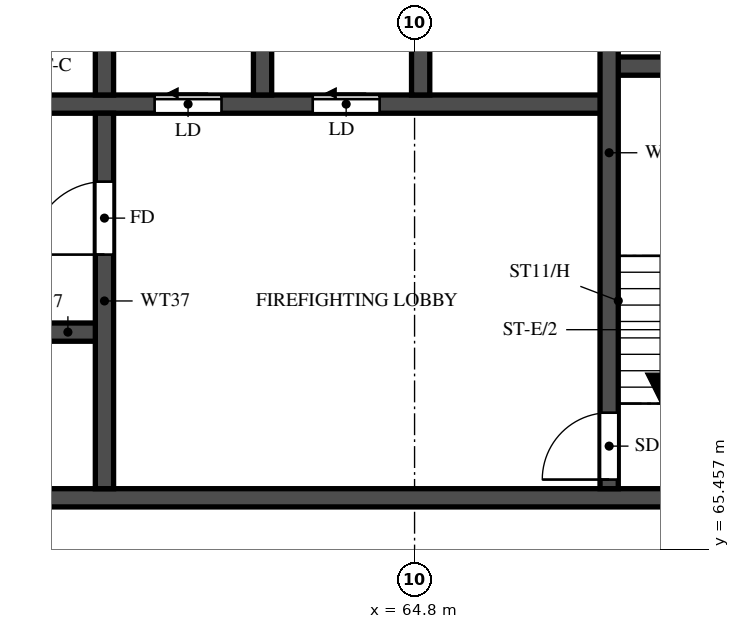
"""IFC4 building model, lengths in metres.
Left out: names, types, materials, properties, quantities, classifications, styles, units other than length and angle.
Written with IfcOpenShell. Run it as: python <this file> out.ifc"""

import sys

from ifc_helpers import new_model, si_unit, direction, frame, frame_2d, origin, place, context, subcontext, project, spatial, rectangle, extrude, element, fill, save


model = new_model("IFC4")
c1 = context("Model", 3, precision=1e-05, world=origin(), true_north=direction((0.0, 1.0)))
c2 = subcontext(c1, "Body", "Model", "MODEL_VIEW")
j1 = project(units=[si_unit("LENGTHUNIT", "METRE"), si_unit("PLANEANGLEUNIT", "RADIAN")], contexts=[c1])
p1 = place(None, origin())
s1 = spatial("IfcSite", under=j1, at=p1, CompositionType="ELEMENT")
p2 = place(p1, origin())
s2 = spatial("IfcBuilding", under=s1, at=p2, CompositionType="ELEMENT")
p3 = place(p2, frame((0.0, 0.0, 232.5)))
s3 = spatial("IfcBuildingStorey", under=s2, at=p3, CompositionType="ELEMENT", Elevation=232.5)
p4 = place(p3, frame((29.2, 66.3, 0.0), z_axis=(0.0, 0.0, 1.0), x_axis=(1.0, 0.0, 0.0)))
e1 = element("IfcWall", 1, at=p4, inside=s3, PredefinedType="SHEAR", context=c2, shape_type="SweptSolid", body=[
    extrude(rectangle(XDim=42.4, YDim=0.3, at=frame_2d((21.2, 0.0))), origin(), (0.0, 0.0, 1.0), 3.22),
])
p5 = place(p4, frame((1.425, 0.0, 0.0)))
e2 = element("IfcOpeningElement", 2, at=p5, cuts=e1, PredefinedType="OPENING", context=c2, shape_type="SweptSolid", body=[
    extrude(rectangle(XDim=1.1, YDim=2.1, at=frame_2d((0.55, 1.05))), frame((0.0, 0.16, 0.0), z_axis=(0.0, -1.0, 0.0), x_axis=(1.0, 0.0, 0.0)), (0.0, 0.0, 1.0), 0.32),
])
p6 = place(p4, frame((4.2, 0.0, 0.0)))
e3 = element("IfcOpeningElement", 3, at=p6, cuts=e1, PredefinedType="OPENING", context=c2, shape_type="SweptSolid", body=[
    extrude(rectangle(XDim=1.8, YDim=2.1, at=frame_2d((0.9, 1.05))), frame((0.0, 0.16, 0.0), z_axis=(0.0, -1.0, 0.0), x_axis=(1.0, 0.0, 0.0)), (0.0, 0.0, 1.0), 0.32),
])
p7 = place(p3, frame((35.65, 69.025, 0.0), z_axis=(0.0, 0.0, 1.0), x_axis=(1.0, 0.0, 0.0)))
e4 = element("IfcWall", 4, at=p7, inside=s3, PredefinedType="SHEAR", context=c2, shape_type="SweptSolid", body=[
    extrude(rectangle(XDim=24.05, YDim=0.3, at=frame_2d((12.025, 0.0))), origin(), (0.0, 0.0, 1.0), 3.22),
])
p8 = place(p7, frame((0.975, 0.0, 0.0)))
e5 = element("IfcOpeningElement", 5, at=p8, cuts=e4, PredefinedType="OPENING", context=c2, shape_type="SweptSolid", body=[
    extrude(rectangle(XDim=1.1, YDim=2.1, at=frame_2d((0.55, 1.05))), frame((0.0, 0.16, 0.0), z_axis=(0.0, -1.0, 0.0), x_axis=(1.0, 0.0, 0.0)), (0.0, 0.0, 1.0), 0.32),
])
p9 = place(p7, frame((3.725, 0.0, 0.0)))
e6 = element("IfcOpeningElement", 6, at=p9, cuts=e4, PredefinedType="OPENING", context=c2, shape_type="SweptSolid", body=[
    extrude(rectangle(XDim=1.1, YDim=2.1, at=frame_2d((0.55, 1.05))), frame((0.0, 0.16, 0.0), z_axis=(0.0, -1.0, 0.0), x_axis=(1.0, 0.0, 0.0)), (0.0, 0.0, 1.0), 0.32),
])
p10 = place(p7, frame((6.475, 0.0, 0.0)))
e7 = element("IfcOpeningElement", 7, at=p10, cuts=e4, PredefinedType="OPENING", context=c2, shape_type="SweptSolid", body=[
    extrude(rectangle(XDim=1.1, YDim=2.1, at=frame_2d((0.55, 1.05))), frame((0.0, 0.16, 0.0), z_axis=(0.0, -1.0, 0.0), x_axis=(1.0, 0.0, 0.0)), (0.0, 0.0, 1.0), 0.32),
])
p11 = place(p7, frame((9.225, 0.0, 0.0)))
e8 = element("IfcOpeningElement", 8, at=p11, cuts=e4, PredefinedType="OPENING", context=c2, shape_type="SweptSolid", body=[
    extrude(rectangle(XDim=1.1, YDim=2.1, at=frame_2d((0.55, 1.05))), frame((0.0, 0.16, 0.0), z_axis=(0.0, -1.0, 0.0), x_axis=(1.0, 0.0, 0.0)), (0.0, 0.0, 1.0), 0.32),
])
p12 = place(p7, frame((11.975, 0.0, 0.0)))
e9 = element("IfcOpeningElement", 9, at=p12, cuts=e4, PredefinedType="OPENING", context=c2, shape_type="SweptSolid", body=[
    extrude(rectangle(XDim=1.1, YDim=2.1, at=frame_2d((0.55, 1.05))), frame((0.0, 0.16, 0.0), z_axis=(0.0, -1.0, 0.0), x_axis=(1.0, 0.0, 0.0)), (0.0, 0.0, 1.0), 0.32),
])
p13 = place(p7, frame((14.725, 0.0, 0.0)))
e10 = element("IfcOpeningElement", 10, at=p13, cuts=e4, PredefinedType="OPENING", context=c2, shape_type="SweptSolid", body=[
    extrude(rectangle(XDim=1.1, YDim=2.1, at=frame_2d((0.55, 1.05))), frame((0.0, 0.16, 0.0), z_axis=(0.0, -1.0, 0.0), x_axis=(1.0, 0.0, 0.0)), (0.0, 0.0, 1.0), 0.32),
])
p14 = place(p7, frame((17.6, 0.0, 0.0)))
e11 = element("IfcOpeningElement", 11, at=p14, cuts=e4, PredefinedType="OPENING", context=c2, shape_type="SweptSolid", body=[
    extrude(rectangle(XDim=1.1, YDim=2.1, at=frame_2d((0.55, 1.05))), frame((0.0, 0.16, 0.0), z_axis=(0.0, -1.0, 0.0), x_axis=(1.0, 0.0, 0.0)), (0.0, 0.0, 1.0), 0.32),
])
p15 = place(p7, frame((20.6, 0.0, 0.0)))
e12 = element("IfcOpeningElement", 12, at=p15, cuts=e4, PredefinedType="OPENING", context=c2, shape_type="SweptSolid", body=[
    extrude(rectangle(XDim=1.1, YDim=2.1, at=frame_2d((0.55, 1.05))), frame((0.0, 0.16, 0.0), z_axis=(0.0, -1.0, 0.0), x_axis=(1.0, 0.0, 0.0)), (0.0, 0.0, 1.0), 0.32),
])
p16 = place(p3, frame((32.8, 72.775, 0.0), z_axis=(0.0, 0.0, 1.0), x_axis=(1.0, 0.0, 0.0)))
e13 = element("IfcWall", 13, at=p16, inside=s3, PredefinedType="SHEAR", context=c2, shape_type="SweptSolid", body=[
    extrude(rectangle(XDim=35.2, YDim=0.3, at=frame_2d((17.6, 0.0))), origin(), (0.0, 0.0, 1.0), 3.22),
])
p17 = place(p16, frame((19.8, 0.0, 0.0)))
e14 = element("IfcOpeningElement", 14, at=p17, cuts=e13, PredefinedType="OPENING", context=c2, shape_type="SweptSolid", body=[
    extrude(rectangle(XDim=1.1, YDim=2.1, at=frame_2d((0.55, 1.05))), frame((0.0, 0.16, 0.0), z_axis=(0.0, -1.0, 0.0), x_axis=(1.0, 0.0, 0.0)), (0.0, 0.0, 1.0), 0.32),
])
p18 = place(p16, frame((27.725, 0.0, 0.0)))
e15 = element("IfcOpeningElement", 15, at=p18, cuts=e13, PredefinedType="OPENING", context=c2, shape_type="SweptSolid", body=[
    extrude(rectangle(XDim=1.1, YDim=2.1, at=frame_2d((0.55, 1.05))), frame((0.0, 0.16, 0.0), z_axis=(0.0, -1.0, 0.0), x_axis=(1.0, 0.0, 0.0)), (0.0, 0.0, 1.0), 0.32),
])
p19 = place(p16, frame((30.325, 0.0, 0.0)))
e16 = element("IfcOpeningElement", 16, at=p19, cuts=e13, PredefinedType="OPENING", context=c2, shape_type="SweptSolid", body=[
    extrude(rectangle(XDim=1.1, YDim=2.1, at=frame_2d((0.55, 1.05))), frame((0.0, 0.16, 0.0), z_axis=(0.0, -1.0, 0.0), x_axis=(1.0, 0.0, 0.0)), (0.0, 0.0, 1.0), 0.32),
])
p20 = place(p16, frame((3.825, 0.0, 0.0)))
e17 = element("IfcOpeningElement", 17, at=p20, cuts=e13, PredefinedType="OPENING", context=c2, shape_type="SweptSolid", body=[
    extrude(rectangle(XDim=1.1, YDim=2.1, at=frame_2d((0.55, 1.05))), frame((0.0, 0.16, 0.0), z_axis=(0.0, -1.0, 0.0), x_axis=(1.0, 0.0, 0.0)), (0.0, 0.0, 1.0), 0.32),
])
p21 = place(p16, frame((6.575, 0.0, 0.0)))
e18 = element("IfcOpeningElement", 18, at=p21, cuts=e13, PredefinedType="OPENING", context=c2, shape_type="SweptSolid", body=[
    extrude(rectangle(XDim=1.1, YDim=2.1, at=frame_2d((0.55, 1.05))), frame((0.0, 0.16, 0.0), z_axis=(0.0, -1.0, 0.0), x_axis=(1.0, 0.0, 0.0)), (0.0, 0.0, 1.0), 0.32),
])
p22 = place(p16, frame((9.325, 0.0, 0.0)))
e19 = element("IfcOpeningElement", 19, at=p22, cuts=e13, PredefinedType="OPENING", context=c2, shape_type="SweptSolid", body=[
    extrude(rectangle(XDim=1.1, YDim=2.1, at=frame_2d((0.55, 1.05))), frame((0.0, 0.16, 0.0), z_axis=(0.0, -1.0, 0.0), x_axis=(1.0, 0.0, 0.0)), (0.0, 0.0, 1.0), 0.32),
])
p23 = place(p16, frame((12.075, 0.0, 0.0)))
e20 = element("IfcOpeningElement", 20, at=p23, cuts=e13, PredefinedType="OPENING", context=c2, shape_type="SweptSolid", body=[
    extrude(rectangle(XDim=1.1, YDim=2.1, at=frame_2d((0.55, 1.05))), frame((0.0, 0.16, 0.0), z_axis=(0.0, -1.0, 0.0), x_axis=(1.0, 0.0, 0.0)), (0.0, 0.0, 1.0), 0.32),
])
p24 = place(p16, frame((14.825, 0.0, 0.0)))
e21 = element("IfcOpeningElement", 21, at=p24, cuts=e13, PredefinedType="OPENING", context=c2, shape_type="SweptSolid", body=[
    extrude(rectangle(XDim=1.1, YDim=2.1, at=frame_2d((0.55, 1.05))), frame((0.0, 0.16, 0.0), z_axis=(0.0, -1.0, 0.0), x_axis=(1.0, 0.0, 0.0)), (0.0, 0.0, 1.0), 0.32),
])
p25 = place(p16, frame((17.575, 0.0, 0.0)))
e22 = element("IfcOpeningElement", 22, at=p25, cuts=e13, PredefinedType="OPENING", context=c2, shape_type="SweptSolid", body=[
    extrude(rectangle(XDim=1.1, YDim=2.1, at=frame_2d((0.55, 1.05))), frame((0.0, 0.16, 0.0), z_axis=(0.0, -1.0, 0.0), x_axis=(1.0, 0.0, 0.0)), (0.0, 0.0, 1.0), 0.32),
])
p26 = place(p16, frame((0.95, 0.0, 0.0)))
e23 = element("IfcOpeningElement", 23, at=p26, cuts=e13, PredefinedType="OPENING", context=c2, shape_type="SweptSolid", body=[
    extrude(rectangle(XDim=1.1, YDim=2.1, at=frame_2d((0.55, 1.05))), frame((0.0, 0.16, 0.0), z_axis=(0.0, -1.0, 0.0), x_axis=(1.0, 0.0, 0.0)), (0.0, 0.0, 1.0), 0.32),
])
p27 = place(p3, frame((68.0, 73.4, 0.0), z_axis=(0.0, 0.0, 1.0), x_axis=(1.0, 0.0, 0.0)))
e24 = element("IfcWall", 24, at=p27, inside=s3, PredefinedType="SHEAR", context=c2, shape_type="SweptSolid", body=[
    extrude(rectangle(XDim=3.1, YDim=0.3, at=frame_2d((1.55, 0.0))), origin(), (0.0, 0.0, 1.0), 3.22),
])
p28 = place(p3, frame((68.0, 66.45, 0.0), z_axis=(0.0, 0.0, 1.0), x_axis=(0.0, 1.0, 0.0)))
e25 = element("IfcWall", 25, at=p28, inside=s3, PredefinedType="SHEAR", context=c2, shape_type="SweptSolid", body=[
    extrude(rectangle(XDim=11.05, YDim=0.3, at=frame_2d((5.525, 0.0))), origin(), (0.0, 0.0, 1.0), 3.22),
])
p29 = place(p28, frame((0.15, 0.0, 0.0)))
e26 = element("IfcOpeningElement", 26, at=p29, cuts=e25, PredefinedType="OPENING", context=c2, shape_type="SweptSolid", body=[
    extrude(rectangle(XDim=1.1, YDim=2.1, at=frame_2d((0.55, 1.05))), frame((0.0, 0.16, 0.0), z_axis=(0.0, -1.0, 0.0), x_axis=(1.0, 0.0, 0.0)), (0.0, 0.0, 1.0), 0.32),
])
p30 = place(p3, frame((59.7, 66.45, 0.0), z_axis=(0.0, 0.0, 1.0), x_axis=(0.0, 1.0, 0.0)))
e27 = element("IfcWall", 27, at=p30, inside=s3, PredefinedType="SHEAR", context=c2, shape_type="SweptSolid", body=[
    extrude(rectangle(XDim=6.175, YDim=0.3, at=frame_2d((3.087, 0.0))), origin(), (0.0, 0.0, 1.0), 3.22),
])
p31 = place(p30, frame((3.85, 0.0, 0.0)))
e28 = element("IfcOpeningElement", 28, at=p31, cuts=e27, PredefinedType="OPENING", context=c2, shape_type="SweptSolid", body=[
    extrude(rectangle(XDim=1.2, YDim=2.1, at=frame_2d((0.6, 1.05))), frame((0.0, 0.16, 0.0), z_axis=(0.0, -1.0, 0.0), x_axis=(1.0, 0.0, 0.0)), (0.0, 0.0, 1.0), 0.32),
])
for number, where, z_axis, x_axis in (
    (29, (59.7, 72.925, 0.0), (0.0, 0.0, 1.0), (0.0, 1.0, 0.0)),
    (30, (62.3, 72.925, 0.0), (0.0, 0.0, 1.0), (0.0, 1.0, 0.0)),
    (31, (64.9, 72.925, 0.0), (0.0, 0.0, 1.0), (0.0, 1.0, 0.0)),
):
    element("IfcWall", number, at=place(p3, frame(where, z_axis=z_axis, x_axis=x_axis)), inside=s3, PredefinedType="SHEAR", context=c2, shape_type="SweptSolid", body=[
        extrude(rectangle(XDim=2.95, YDim=0.3, at=frame_2d((1.475, 0.0))), origin(), (0.0, 0.0, 1.0), 3.22),
    ])
p32 = place(p29, origin())
e32 = element("IfcDoor", 32, at=p32, inside=s3, OperationType="SINGLE_SWING_RIGHT", PredefinedType="DOOR", context=c2, shape_type="SweptSolid", body=[
    extrude(rectangle(XDim=1.1, YDim=2.1, at=frame_2d((0.55, 1.05))), frame((0.0, 0.025, 0.0), z_axis=(0.0, -1.0, 0.0), x_axis=(1.0, 0.0, 0.0)), (0.0, 0.0, 1.0), 0.05),
])
fill(e26, e32)
p33 = place(p31, origin())
e33 = element("IfcDoor", 33, at=p33, inside=s3, OperationType="SINGLE_SWING_LEFT", PredefinedType="DOOR", context=c2, shape_type="SweptSolid", body=[
    extrude(rectangle(XDim=1.2, YDim=2.1, at=frame_2d((0.6, 1.05))), frame((0.0, 0.025, 0.0), z_axis=(0.0, -1.0, 0.0), x_axis=(1.0, 0.0, 0.0)), (0.0, 0.0, 1.0), 0.05),
])
fill(e28, e33)
p34 = place(p18, origin())
e34 = element("IfcDoor", 34, at=p34, inside=s3, OperationType="SLIDING_TO_LEFT", PredefinedType="DOOR", context=c2, shape_type="SweptSolid", body=[
    extrude(rectangle(XDim=1.1, YDim=2.1, at=frame_2d((0.55, 1.05))), frame((0.0, 0.025, 0.0), z_axis=(0.0, -1.0, 0.0), x_axis=(1.0, 0.0, 0.0)), (0.0, 0.0, 1.0), 0.05),
])
fill(e15, e34)
p35 = place(p19, origin())
e35 = element("IfcDoor", 35, at=p35, inside=s3, OperationType="SLIDING_TO_LEFT", PredefinedType="DOOR", context=c2, shape_type="SweptSolid", body=[
    extrude(rectangle(XDim=1.1, YDim=2.1, at=frame_2d((0.55, 1.05))), frame((0.0, 0.025, 0.0), z_axis=(0.0, -1.0, 0.0), x_axis=(1.0, 0.0, 0.0)), (0.0, 0.0, 1.0), 0.05),
])
fill(e16, e35)
save(model, sys.argv[1])
